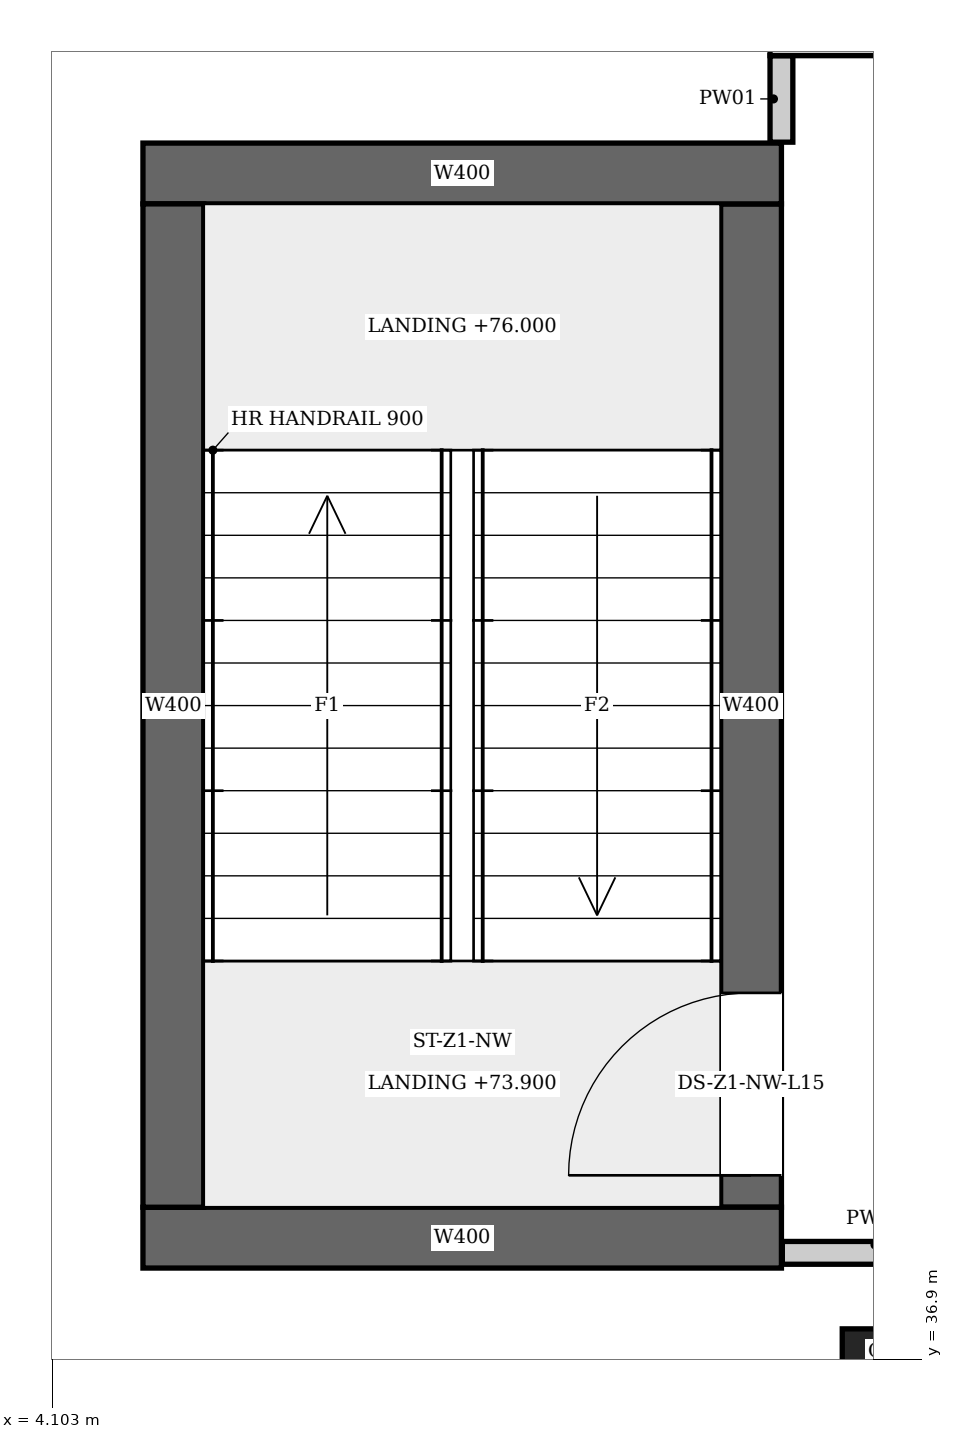
"""IFC4 building model, lengths in metres.
Left out: names, types, materials, properties, quantities, classifications, styles, units other than length and angle.
Written with IfcOpenShell. Run it as: python <this file> out.ifc"""

import sys

from ifc_helpers import new_model, si_unit, direction, frame, frame_2d, origin, origin_2d, place, context, subcontext, project, spatial, rectangle, extrude, element, fill, save


model = new_model("IFC4")
c1 = context("Model", 3, precision=1e-05, world=origin(), true_north=direction((0.0, 1.0)))
c2 = subcontext(c1, "Body", "Model", "MODEL_VIEW")
j1 = project(units=[si_unit("LENGTHUNIT", "METRE"), si_unit("PLANEANGLEUNIT", "RADIAN")], contexts=[c1])
p1 = place(None, origin())
s1 = spatial("IfcSite", under=j1, at=p1, CompositionType="ELEMENT")
p2 = place(p1, origin())
s2 = spatial("IfcBuilding", under=s1, at=p2, CompositionType="ELEMENT")
p3 = place(p2, frame((0.0, 0.0, 73.9)))
s3 = spatial("IfcBuildingStorey", under=s2, at=p3, CompositionType="ELEMENT", Elevation=73.9)
for number, where, z_axis, x_axis in (
    (1, (4.7, 37.7, 0.0), (0.0, 0.0, 1.0), (1.0, 0.0, 0.0)),
    (2, (4.7, 44.7, 0.0), (0.0, 0.0, 1.0), (1.0, 0.0, 0.0)),
):
    element("IfcWall", number, at=place(p3, frame(where, z_axis=z_axis, x_axis=x_axis)), inside=s3, PredefinedType="SHEAR", context=c2, shape_type="SweptSolid", body=[
        extrude(rectangle(XDim=4.2, YDim=0.4, at=frame_2d((2.1, 0.0))), origin(), (0.0, 0.0, 1.0), 4.2),
    ])
p4 = place(p3, frame((4.9, 37.9, 0.0), z_axis=(0.0, 0.0, 1.0), x_axis=(0.0, 1.0, 0.0)))
e3 = element("IfcWall", 3, at=p4, inside=s3, PredefinedType="SHEAR", context=c2, shape_type="SweptSolid", body=[
    extrude(rectangle(XDim=6.6, YDim=0.4, at=frame_2d((3.3, 0.0))), origin(), (0.0, 0.0, 1.0), 4.2),
])
p5 = place(p3, frame((8.7, 37.9, 0.0), z_axis=(0.0, 0.0, 1.0), x_axis=(0.0, 1.0, 0.0)))
e4 = element("IfcWall", 4, at=p5, inside=s3, PredefinedType="SHEAR", context=c2, shape_type="SweptSolid", body=[
    extrude(rectangle(XDim=6.6, YDim=0.4, at=frame_2d((3.3, 0.0))), origin(), (0.0, 0.0, 1.0), 4.2),
])
p6 = place(p5, frame((0.21, 0.0, 0.0)))
e5 = element("IfcOpeningElement", 5, at=p6, cuts=e4, PredefinedType="OPENING", context=c2, shape_type="SweptSolid", body=[
    extrude(rectangle(XDim=1.2, YDim=2.1, at=frame_2d((0.6, 1.05))), frame((0.0, 0.21, 0.0), z_axis=(0.0, -1.0, 0.0), x_axis=(1.0, 0.0, 0.0)), (0.0, 0.0, 1.0), 0.42),
])
p7 = place(p3, frame((9.6, 36.8, 0.0), z_axis=(0.0, 0.0, 1.0), x_axis=(1.0, 0.0, 0.0)))
e6 = element("IfcColumn", 6, at=p7, inside=s3, PredefinedType="COLUMN", context=c2, shape_type="SweptSolid", body=[
    extrude(rectangle(XDim=0.6, YDim=0.6, at=origin_2d()), origin(), (0.0, 0.0, 1.0), 4.2),
])
p8 = place(p3, frame((8.9, 44.906, 0.0), z_axis=(0.0, 0.0, 1.0), x_axis=(0.0, 1.0, 0.0)))
e7 = element("IfcWall", 7, at=p8, inside=s3, PredefinedType="PARTITIONING", context=c2, shape_type="SweptSolid", body=[
    extrude(rectangle(XDim=0.569, YDim=0.15, at=frame_2d((0.285, 0.0))), origin(), (0.0, 0.0, 1.0), 3.9),
])
p9 = place(p3, frame((8.825, 45.55, 0.0), z_axis=(0.0, 0.0, 1.0), x_axis=(1.0, 0.0, 0.0)))
e8 = element("IfcWall", 8, at=p9, inside=s3, PredefinedType="PARTITIONING", context=c2, shape_type="SweptSolid", body=[
    extrude(rectangle(XDim=2.55, YDim=0.15, at=frame_2d((1.275, 0.0))), origin(), (0.0, 0.0, 1.0), 3.9),
])
p10 = place(p3, frame((8.906, 37.6, 0.0), z_axis=(0.0, 0.0, 1.0), x_axis=(1.0, 0.0, 0.0)))
e9 = element("IfcWall", 9, at=p10, inside=s3, PredefinedType="PARTITIONING", context=c2, shape_type="SweptSolid", body=[
    extrude(rectangle(XDim=1.219, YDim=0.15, at=frame_2d((0.609, 0.0))), origin(), (0.0, 0.0, 1.0), 3.9),
])
p11 = place(p6, origin())
e10 = element("IfcDoor", 10, at=p11, inside=s3, OperationType="SINGLE_SWING_RIGHT", PredefinedType="DOOR", context=c2, shape_type="SweptSolid", body=[
    extrude(rectangle(XDim=1.2, YDim=2.1, at=frame_2d((0.6, 1.05))), frame((0.0, 0.025, 0.0), z_axis=(0.0, -1.0, 0.0), x_axis=(1.0, 0.0, 0.0)), (0.0, 0.0, 1.0), 0.05),
])
fill(e5, e10)
save(model, sys.argv[1])
